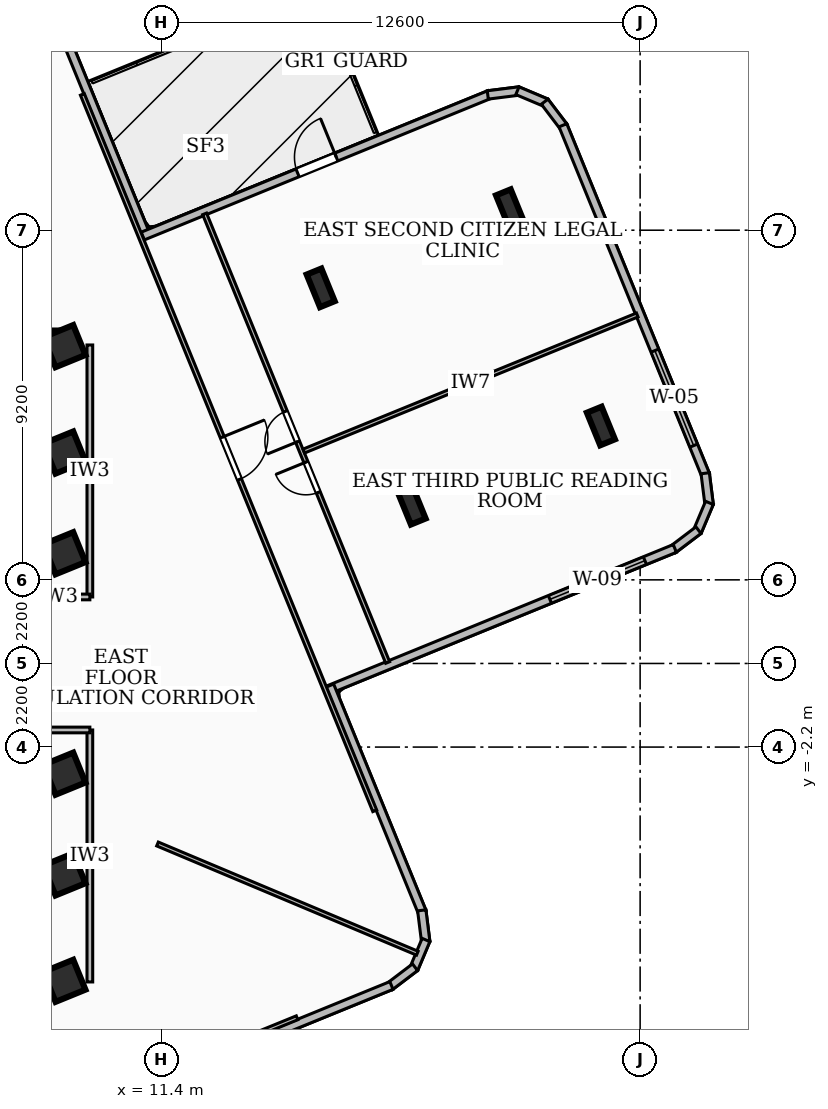
"""IFC4 building model, lengths in metres.
Left out: names, types, materials, properties, quantities, classifications, styles, units other than length and angle.
Written with IfcOpenShell. Run it as: python <this file> out.ifc"""

import sys

from ifc_helpers import new_model, si_unit, direction, frame, frame_2d, origin, origin_2d, place, context, subcontext, project, spatial, rectangle, i_section, extrude, element, fill, save


model = new_model("IFC4")
c1 = context("Model", 3, precision=1e-05, world=origin(), true_north=direction((0.0, 1.0)))
c2 = subcontext(c1, "Body", "Model", "MODEL_VIEW")
j1 = project(units=[si_unit("LENGTHUNIT", "METRE"), si_unit("PLANEANGLEUNIT", "RADIAN")], contexts=[c1])
p1 = place(None, origin())
s1 = spatial("IfcSite", under=j1, at=p1, CompositionType="ELEMENT")
p2 = place(p1, origin())
s2 = spatial("IfcBuilding", under=s1, at=p2, CompositionType="ELEMENT")
p3 = place(p2, frame((0.0, 0.0, 177.48)))
s3 = spatial("IfcBuildingStorey", under=s2, at=p3, CompositionType="ELEMENT", Elevation=177.48)
for number, where, z_axis, x_axis in (
    (1, (-8.78, 8.535, 0.0), (0.0, 0.0, 1.0), (1.0, 0.0, 0.0)),
    (2, (8.78, -8.535, 0.0), (0.0, 0.0, 1.0), (-1.0, 0.0, 0.0)),
):
    element("IfcWall", number, at=place(p3, frame(where, z_axis=z_axis, x_axis=x_axis)), inside=s3, PredefinedType="SHEAR", context=c2, shape_type="SweptSolid", body=[
        extrude(rectangle(XDim=17.56, YDim=0.45, at=frame_2d((8.78, 0.0))), origin(), (0.0, 0.0, 1.0), 3.34),
    ])
for number, where, z_axis, x_axis in (
    (3, (8.85, -5.55, 0.0), (0.0, 0.0, 1.0), (0.926, 0.378, 0.0)),
    (4, (8.85, -2.9, 0.0), (0.0, 0.0, 1.0), (0.926, 0.378, 0.0)),
    (5, (8.85, 2.9, 0.0), (0.0, 0.0, 1.0), (0.926, 0.378, 0.0)),
    (6, (8.85, 5.55, 0.0), (0.0, 0.0, 1.0), (0.926, 0.378, 0.0)),
    (7, (8.85, -8.35, 0.0), (0.0, 0.0, 1.0), (0.926, 0.378, 0.0)),
    (8, (8.85, 8.35, 0.0), (0.0, 0.0, 1.0), (0.926, 0.378, 0.0)),
):
    element("IfcColumn", number, at=place(p3, frame(where, z_axis=z_axis, x_axis=x_axis)), inside=s3, PredefinedType="COLUMN", context=c2, shape_type="SweptSolid", body=[
        extrude(rectangle(XDim=0.85, YDim=0.85, at=origin_2d()), origin(), (0.0, 0.0, 1.0), 3.6),
    ])
for number, where, z_axis, x_axis in (
    (9, (17.987, 4.164, 0.0), (0.0, 0.0, 1.0), (0.926, 0.378, 0.0)),
    (10, (15.594, 9.883, 0.0), (0.0, 0.0, 1.0), (0.926, 0.378, 0.0)),
    (11, (22.968, 6.248, 0.0), (0.0, 0.0, 1.0), (0.926, 0.378, 0.0)),
    (12, (20.576, 11.967, 0.0), (0.0, 0.0, 1.0), (0.926, 0.378, 0.0)),
):
    element("IfcColumn", number, at=place(p3, frame(where, z_axis=z_axis, x_axis=x_axis)), inside=s3, PredefinedType="COLUMN", context=c2, shape_type="SweptSolid", body=[
        extrude(i_section(OverallWidth=0.418, OverallDepth=0.927, WebThickness=0.019, FlangeThickness=0.032, at=origin_2d()), origin(), (0.0, 0.0, 1.0), 3.6),
    ])
p4 = place(p3, frame((8.473, 17.456, 0.0), z_axis=(0.0, 0.0, 1.0), x_axis=(0.377728271133, -0.925916493636, 0.0)))
e13 = element("IfcWall", 13, at=p4, inside=s3, PredefinedType="SOLIDWALL", context=c2, shape_type="SweptSolid", body=[
    extrude(rectangle(XDim=6.759, YDim=0.22, at=frame_2d((3.379, 0.0))), origin(), (0.0, 0.0, 1.0), 3.34),
])
p5 = place(p3, frame((10.912, 11.246, 0.0), z_axis=(0.0, 0.0, 1.0), x_axis=(0.925863027914, 0.377859303897, 0.0)))
e14 = element("IfcWall", 14, at=p5, inside=s3, PredefinedType="SOLIDWALL", context=c2, shape_type="SweptSolid", body=[
    extrude(rectangle(XDim=9.858, YDim=0.22, at=frame_2d((4.929, 0.0))), origin(), (0.0, 0.0, 1.0), 3.34),
])
p6 = place(p5, frame((4.4, 0.0, 0.0)))
e15 = element("IfcOpeningElement", 15, at=p6, cuts=e14, PredefinedType="OPENING", context=c2, shape_type="SweptSolid", body=[
    extrude(rectangle(XDim=1.1, YDim=2.1, at=frame_2d((0.55, 1.05))), frame((0.0, 0.12, 0.0), z_axis=(0.0, -1.0, 0.0), x_axis=(1.0, 0.0, 0.0)), (0.0, 0.0, 1.0), 0.24),
])
p7 = place(p3, frame((19.991, 14.959, 0.0), z_axis=(0.0, 0.0, 1.0), x_axis=(0.992205706202, 0.124610740225, 0.0)))
e16 = element("IfcWall", 16, at=p7, inside=s3, PredefinedType="SOLIDWALL", context=c2, shape_type="SweptSolid", body=[
    extrude(rectangle(XDim=0.835, YDim=0.22, at=frame_2d((0.417, 0.0))), origin(), (0.0, 0.0, 1.0), 3.34),
])
p8 = place(p3, frame((20.771, 15.07, 0.0), z_axis=(0.0, 0.0, 1.0), x_axis=(0.92151752204, -0.388336782412, 0.0)))
e17 = element("IfcWall", 17, at=p8, inside=s3, PredefinedType="SOLIDWALL", context=c2, shape_type="SweptSolid", body=[
    extrude(rectangle(XDim=0.819, YDim=0.22, at=frame_2d((0.41, 0.0))), origin(), (0.0, 0.0, 1.0), 3.34),
])
p9 = place(p3, frame((21.488, 14.782, 0.0), z_axis=(0.0, 0.0, 1.0), x_axis=(0.604489037034, -0.796613459657, 0.0)))
e18 = element("IfcWall", 18, at=p9, inside=s3, PredefinedType="SOLIDWALL", context=c2, shape_type="SweptSolid", body=[
    extrude(rectangle(XDim=0.833, YDim=0.22, at=frame_2d((0.417, 0.0))), origin(), (0.0, 0.0, 1.0), 3.34),
])
p10 = place(p3, frame((21.968, 14.161, 0.0), z_axis=(0.0, 0.0, 1.0), x_axis=(0.377847588582, -0.925867809032, 0.0)))
e19 = element("IfcWall", 19, at=p10, inside=s3, PredefinedType="SOLIDWALL", context=c2, shape_type="SweptSolid", body=[
    extrude(rectangle(XDim=9.941, YDim=0.22, at=frame_2d((4.97, 0.0))), origin(), (0.0, 0.0, 1.0), 3.34),
])
p11 = place(p10, frame((6.404, 0.0, 0.85)))
e20 = element("IfcOpeningElement", 20, at=p11, cuts=e19, PredefinedType="OPENING", context=c2, shape_type="SweptSolid", body=[
    extrude(rectangle(XDim=2.7, YDim=1.85, at=frame_2d((1.35, 0.925))), frame((0.0, 0.12, 0.0), z_axis=(0.0, -1.0, 0.0), x_axis=(1.0, 0.0, 0.0)), (0.0, 0.0, 1.0), 0.24),
])
p12 = place(p3, frame((25.712, 5.005, 0.0), z_axis=(0.0, 0.0, 1.0), x_axis=(0.124646916858, -0.992201162123, 0.0)))
e21 = element("IfcWall", 21, at=p12, inside=s3, PredefinedType="SOLIDWALL", context=c2, shape_type="SweptSolid", body=[
    extrude(rectangle(XDim=0.834, YDim=0.22, at=frame_2d((0.417, 0.0))), origin(), (0.0, 0.0, 1.0), 3.34),
])
p13 = place(p3, frame((25.823, 4.225, 0.0), z_axis=(0.0, 0.0, 1.0), x_axis=(-0.387804180062, -0.921741784844, 0.0)))
e22 = element("IfcWall", 22, at=p13, inside=s3, PredefinedType="SOLIDWALL", context=c2, shape_type="SweptSolid", body=[
    extrude(rectangle(XDim=0.82, YDim=0.22, at=frame_2d((0.41, 0.0))), origin(), (0.0, 0.0, 1.0), 3.34),
])
p14 = place(p3, frame((25.535, 3.507, 0.0), z_axis=(0.0, 0.0, 1.0), x_axis=(-0.796793288666, -0.604251979837, 0.0)))
e23 = element("IfcWall", 23, at=p14, inside=s3, PredefinedType="SOLIDWALL", context=c2, shape_type="SweptSolid", body=[
    extrude(rectangle(XDim=0.834, YDim=0.22, at=frame_2d((0.417, 0.0))), origin(), (0.0, 0.0, 1.0), 3.34),
])
p15 = place(p3, frame((24.913, 3.027, 0.0), z_axis=(0.0, 0.0, 1.0), x_axis=(-0.925892554472, -0.37778694733, 0.0)))
e24 = element("IfcWall", 24, at=p15, inside=s3, PredefinedType="SOLIDWALL", context=c2, shape_type="SweptSolid", body=[
    extrude(rectangle(XDim=9.858, YDim=0.22, at=frame_2d((4.929, 0.0))), origin(), (0.0, 0.0, 1.0), 3.34),
])
p16 = place(p15, frame((0.85, 0.0, 0.85)))
e25 = element("IfcOpeningElement", 25, at=p16, cuts=e24, PredefinedType="OPENING", context=c2, shape_type="SweptSolid", body=[
    extrude(rectangle(XDim=2.7, YDim=1.65, at=frame_2d((1.35, 0.825))), frame((0.0, 0.12, 0.0), z_axis=(0.0, -1.0, 0.0), x_axis=(1.0, 0.0, 0.0)), (0.0, 0.0, 1.0), 0.24),
])
p17 = place(p3, frame((15.834, -0.583, 0.0), z_axis=(0.0, 0.0, 1.0), x_axis=(0.377776256629, -0.925896916469, 0.0)))
e26 = element("IfcWall", 26, at=p17, inside=s3, PredefinedType="SOLIDWALL", context=c2, shape_type="SweptSolid", body=[
    extrude(rectangle(XDim=6.438, YDim=0.22, at=frame_2d((3.219, 0.0))), origin(), (0.0, 0.0, 1.0), 3.34),
])
p18 = place(p3, frame((18.254, -6.496, 0.0), z_axis=(0.0, 0.0, 1.0), x_axis=(0.124646916858, -0.992201162123, 0.0)))
e27 = element("IfcWall", 27, at=p18, inside=s3, PredefinedType="SOLIDWALL", context=c2, shape_type="SweptSolid", body=[
    extrude(rectangle(XDim=0.834, YDim=0.22, at=frame_2d((0.417, 0.0))), origin(), (0.0, 0.0, 1.0), 3.34),
])
p19 = place(p3, frame((18.365, -7.276, 0.0), z_axis=(0.0, 0.0, 1.0), x_axis=(-0.387977068381, -0.9216690265, 0.0)))
e28 = element("IfcWall", 28, at=p19, inside=s3, PredefinedType="SOLIDWALL", context=c2, shape_type="SweptSolid", body=[
    extrude(rectangle(XDim=0.819, YDim=0.22, at=frame_2d((0.41, 0.0))), origin(), (0.0, 0.0, 1.0), 3.34),
])
p20 = place(p3, frame((18.077, -7.993, 0.0), z_axis=(0.0, 0.0, 1.0), x_axis=(-0.796365329878, -0.604815890473, 0.0)))
e29 = element("IfcWall", 29, at=p20, inside=s3, PredefinedType="SOLIDWALL", context=c2, shape_type="SweptSolid", body=[
    extrude(rectangle(XDim=0.833, YDim=0.22, at=frame_2d((0.417, 0.0))), origin(), (0.0, 0.0, 1.0), 3.34),
])
p21 = place(p3, frame((17.456, -8.473, 0.0), z_axis=(0.0, 0.0, 1.0), x_axis=(-0.925916493636, -0.377728271133, 0.0)))
e30 = element("IfcWall", 30, at=p21, inside=s3, PredefinedType="SOLIDWALL", context=c2, shape_type="SweptSolid", body=[
    extrude(rectangle(XDim=6.759, YDim=0.22, at=frame_2d((3.379, 0.0))), origin(), (0.0, 0.0, 1.0), 3.34),
])
p22 = place(p3, frame((9.52, 1.75, 0.0), z_axis=(0.0, 0.0, 1.0), x_axis=(0.0, 1.0, 0.0)))
e31 = element("IfcWall", 31, at=p22, inside=s3, PredefinedType="PARTITIONING", context=c2, shape_type="SweptSolid", body=[
    extrude(rectangle(XDim=6.63, YDim=0.15, at=frame_2d((3.315, 0.0))), origin(), (0.0, 0.0, 1.0), 2.644),
])
p23 = place(p3, frame((7.85, 1.75, 0.0), z_axis=(0.0, 0.0, 1.0), x_axis=(1.0, 0.0, 0.0)))
e32 = element("IfcWall", 32, at=p23, inside=s3, PredefinedType="PARTITIONING", context=c2, shape_type="SweptSolid", body=[
    extrude(rectangle(XDim=1.67, YDim=0.15, at=frame_2d((0.835, 0.0))), origin(), (0.0, 0.0, 1.0), 2.57),
])
p24 = place(p3, frame((9.52, -8.38, 0.0), z_axis=(0.0, 0.0, 1.0), x_axis=(0.0, 1.0, 0.0)))
e33 = element("IfcWall", 33, at=p24, inside=s3, PredefinedType="PARTITIONING", context=c2, shape_type="SweptSolid", body=[
    extrude(rectangle(XDim=6.63, YDim=0.15, at=frame_2d((3.315, 0.0))), origin(), (0.0, 0.0, 1.0), 3.34),
])
p25 = place(p3, frame((7.85, -1.75, 0.0), z_axis=(0.0, 0.0, 1.0), x_axis=(1.0, 0.0, 0.0)))
e34 = element("IfcWall", 34, at=p25, inside=s3, PredefinedType="PARTITIONING", context=c2, shape_type="SweptSolid", body=[
    extrude(rectangle(XDim=1.67, YDim=0.15, at=frame_2d((0.835, 0.0))), origin(), (0.0, 0.0, 1.0), 2.57),
])
p26 = place(p3, frame((11.3, -4.75, 0.0), z_axis=(0.0, 0.0, 1.0), x_axis=(0.92186077199, -0.387521247245, 0.0)))
e35 = element("IfcWall", 35, at=p26, inside=s3, PredefinedType="PARTITIONING", context=c2, shape_type="SweptSolid", body=[
    extrude(rectangle(XDim=7.417, YDim=0.11, at=frame_2d((3.708, 0.0))), origin(), (0.0, 0.0, 1.0), 3.34),
])
p27 = place(p3, frame((9.323, 14.973, 0.0), z_axis=(0.0, 0.0, 1.0), x_axis=(0.377891753295, -0.92584978414, 0.0)))
e36 = element("IfcWall", 36, at=p27, inside=s3, PredefinedType="PARTITIONING", context=c2, shape_type="SweptSolid", body=[
    extrude(rectangle(XDim=20.361, YDim=0.11, at=frame_2d((10.18, 0.0))), origin(), (0.0, 0.0, 1.0), 2.644),
])
p28 = place(p27, frame((9.741, 0.0, 0.0)))
e37 = element("IfcOpeningElement", 37, at=p28, cuts=e36, PredefinedType="OPENING", context=c2, shape_type="SweptSolid", body=[
    extrude(rectangle(XDim=1.2, YDim=2.1, at=frame_2d((0.6, 1.05))), frame((0.0, 0.065, 0.0), z_axis=(0.0, -1.0, 0.0), x_axis=(1.0, 0.0, 0.0)), (0.0, 0.0, 1.0), 0.13),
])
p29 = place(p3, frame((15.151, 5.589, 0.0), z_axis=(0.0, 0.0, 1.0), x_axis=(0.925886825242, 0.37780098841, 0.0)))
e38 = element("IfcWall", 38, at=p29, inside=s3, PredefinedType="PARTITIONING", context=c2, shape_type="SweptSolid", body=[
    extrude(rectangle(XDim=9.475, YDim=0.11, at=frame_2d((4.738, 0.0))), origin(), (0.0, 0.0, 1.0), 3.34),
])
p30 = place(p3, frame((17.357, 0.025, 0.0), z_axis=(0.0, 0.0, 1.0), x_axis=(-0.37779315338, 0.925890022227, 0.0)))
e39 = element("IfcWall", 39, at=p30, inside=s3, PredefinedType="PARTITIONING", context=c2, shape_type="SweptSolid", body=[
    extrude(rectangle(XDim=12.75, YDim=0.11, at=frame_2d((6.375, 0.0))), origin(), (0.0, 0.0, 1.0), 2.644),
])
p31 = place(p30, frame((4.835, 0.0, 0.0)))
e40 = element("IfcOpeningElement", 40, at=p31, cuts=e39, PredefinedType="OPENING", context=c2, shape_type="SweptSolid", body=[
    extrude(rectangle(XDim=0.86, YDim=2.04, at=frame_2d((0.43, 1.02))), frame((0.0, 0.065, 0.0), z_axis=(0.0, -1.0, 0.0), x_axis=(1.0, 0.0, 0.0)), (0.0, 0.0, 1.0), 0.13),
])
p32 = place(p30, frame((6.275, 0.0, 0.0)))
e41 = element("IfcOpeningElement", 41, at=p32, cuts=e39, PredefinedType="OPENING", context=c2, shape_type="SweptSolid", body=[
    extrude(rectangle(XDim=0.86, YDim=2.04, at=frame_2d((0.43, 1.02))), frame((0.0, 0.065, 0.0), z_axis=(0.0, -1.0, 0.0), x_axis=(1.0, 0.0, 0.0)), (0.0, 0.0, 1.0), 0.13),
])
p33 = place(p3, frame((14.973, -9.323, 0.0), z_axis=(0.0, 0.0, 1.0), x_axis=(-0.92584978414, -0.377891753295, 0.0)))
e42 = element("IfcWall", 42, at=p33, inside=s3, PredefinedType="PARTITIONING", context=c2, shape_type="SweptSolid", body=[
    extrude(rectangle(XDim=20.361, YDim=0.11, at=frame_2d((10.18, 0.0))), origin(), (0.0, 0.0, 1.0), 2.644),
])
p34 = place(p33, frame((9.741, 0.0, 0.0)))
e43 = element("IfcOpeningElement", 43, at=p34, cuts=e42, PredefinedType="OPENING", context=c2, shape_type="SweptSolid", body=[
    extrude(rectangle(XDim=1.2, YDim=2.1, at=frame_2d((0.6, 1.05))), frame((0.0, 0.065, 0.0), z_axis=(0.0, -1.0, 0.0), x_axis=(1.0, 0.0, 0.0)), (0.0, 0.0, 1.0), 0.13),
])
p35 = place(p6, origin())
e44 = element("IfcDoor", 44, at=p35, inside=s3, OperationType="SINGLE_SWING_RIGHT", PredefinedType="DOOR", context=c2, shape_type="SweptSolid", body=[
    extrude(rectangle(XDim=1.1, YDim=2.1, at=frame_2d((0.55, 1.05))), frame((0.0, 0.025, 0.0), z_axis=(0.0, -1.0, 0.0), x_axis=(1.0, 0.0, 0.0)), (0.0, 0.0, 1.0), 0.05),
])
fill(e15, e44)
p36 = place(p11, origin())
e45 = element("IfcWindow", 45, at=p36, inside=s3, PartitioningType="SINGLE_PANEL", PredefinedType="WINDOW", context=c2, shape_type="SweptSolid", body=[
    extrude(rectangle(XDim=2.7, YDim=1.85, at=frame_2d((1.35, 0.925))), frame((0.0, 0.03, 0.0), z_axis=(0.0, -1.0, 0.0), x_axis=(1.0, 0.0, 0.0)), (0.0, 0.0, 1.0), 0.06),
])
fill(e20, e45)
p37 = place(p16, origin())
e46 = element("IfcWindow", 46, at=p37, inside=s3, PartitioningType="SINGLE_PANEL", PredefinedType="WINDOW", context=c2, shape_type="SweptSolid", body=[
    extrude(rectangle(XDim=2.7, YDim=1.65, at=frame_2d((1.35, 0.825))), frame((0.0, 0.03, 0.0), z_axis=(0.0, -1.0, 0.0), x_axis=(1.0, 0.0, 0.0)), (0.0, 0.0, 1.0), 0.06),
])
fill(e25, e46)
p38 = place(p28, origin())
e47 = element("IfcDoor", 47, at=p38, inside=s3, OperationType="SINGLE_SWING_LEFT", PredefinedType="DOOR", context=c2, shape_type="SweptSolid", body=[
    extrude(rectangle(XDim=1.2, YDim=2.1, at=frame_2d((0.6, 1.05))), frame((0.0, 0.025, 0.0), z_axis=(0.0, -1.0, 0.0), x_axis=(1.0, 0.0, 0.0)), (0.0, 0.0, 1.0), 0.05),
])
fill(e37, e47)
p39 = place(p31, origin())
e48 = element("IfcDoor", 48, at=p39, inside=s3, OperationType="SINGLE_SWING_RIGHT", PredefinedType="DOOR", context=c2, shape_type="SweptSolid", body=[
    extrude(rectangle(XDim=0.86, YDim=2.04, at=frame_2d((0.43, 1.02))), frame((0.0, 0.025, 0.0), z_axis=(0.0, -1.0, 0.0), x_axis=(1.0, 0.0, 0.0)), (0.0, 0.0, 1.0), 0.05),
])
fill(e40, e48)
p40 = place(p32, origin())
e49 = element("IfcDoor", 49, at=p40, inside=s3, OperationType="SINGLE_SWING_LEFT", PredefinedType="DOOR", context=c2, shape_type="SweptSolid", body=[
    extrude(rectangle(XDim=0.86, YDim=2.04, at=frame_2d((0.43, 1.02))), frame((0.0, 0.025, 0.0), z_axis=(0.0, -1.0, 0.0), x_axis=(1.0, 0.0, 0.0)), (0.0, 0.0, 1.0), 0.05),
])
fill(e41, e49)
save(model, sys.argv[1])
